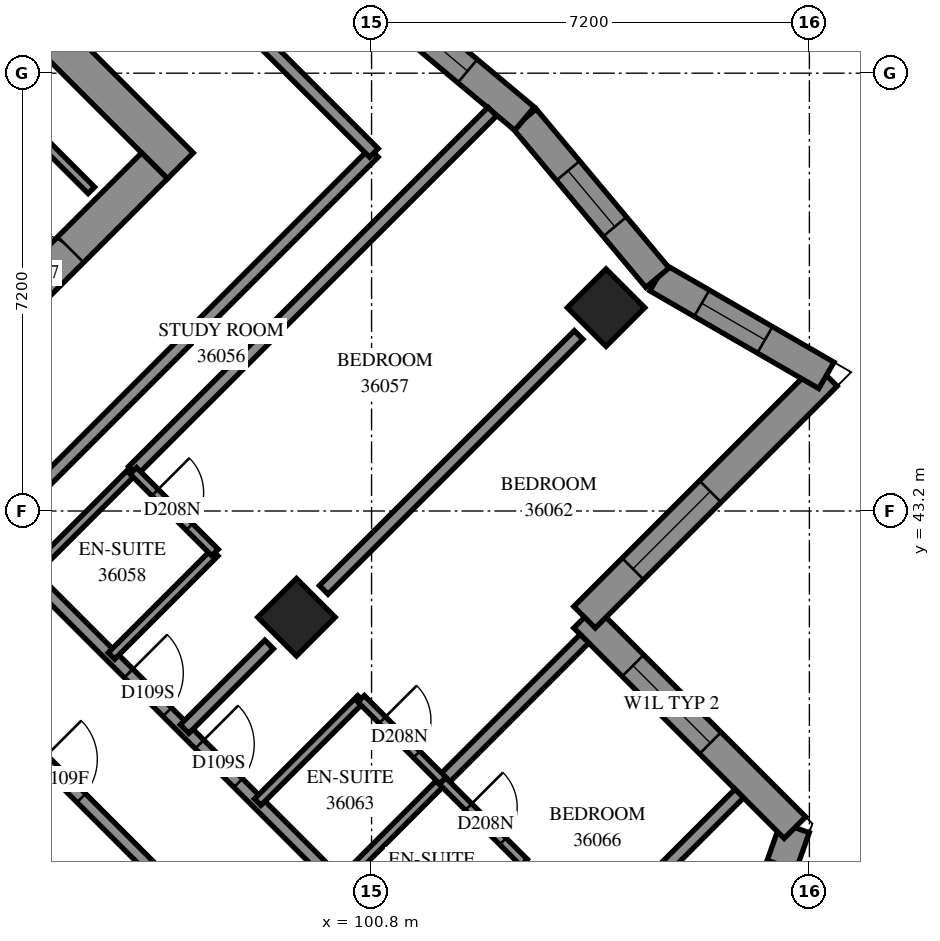
"""IFC4 building model, lengths in metres.
Left out: names, types, materials, properties, quantities, classifications, styles, units other than length and angle.
Written with IfcOpenShell. Run it as: python <this file> out.ifc"""

import sys

from ifc_helpers import new_model, si_unit, direction, frame, frame_2d, origin, origin_2d, place, context, subcontext, project, spatial, polyline, rectangle, outline, extrude, element, fill, save


model = new_model("IFC4")
c1 = context("Model", 3, precision=1e-05, world=origin(), true_north=direction((0.0, 1.0)))
c2 = subcontext(c1, "Body", "Model", "MODEL_VIEW")
j1 = project(units=[si_unit("LENGTHUNIT", "METRE"), si_unit("PLANEANGLEUNIT", "RADIAN")], contexts=[c1])
p1 = place(None, origin())
s1 = spatial("IfcSite", under=j1, at=p1, CompositionType="ELEMENT")
p2 = place(p1, origin())
s2 = spatial("IfcBuilding", under=s1, at=p2, CompositionType="ELEMENT")
p3 = place(p2, frame((0.0, 0.0, 135.4)))
s3 = spatial("IfcBuildingStorey", under=s2, at=p3, CompositionType="ELEMENT", Elevation=135.4)
for number, where, z_axis, x_axis in (
    (1, (104.656, 46.544, 0.0), (0.0, 0.0, 1.0), (0.707, -0.707, 0.0)),
    (2, (99.565, 41.453, 0.0), (0.0, 0.0, 1.0), (0.707, -0.707, 0.0)),
):
    element("IfcColumn", number, at=place(p3, frame(where, z_axis=z_axis, x_axis=x_axis)), inside=s3, PredefinedType="COLUMN", context=c2, shape_type="SweptSolid", body=[
        extrude(rectangle(XDim=0.9, YDim=0.9, at=origin_2d()), origin(), (0.0, 0.0, 1.0), 3.1),
    ])
p4 = place(p3, frame((86.625, 59.908, -0.3), z_axis=(0.0, 0.0, 1.0), x_axis=(0.7071067812, -0.7071067812, 0.0)))
e3 = element("IfcWall", 3, at=p4, inside=s3, PredefinedType="SHEAR", context=c2, shape_type="SweptSolid", body=[
    extrude(rectangle(XDim=15.6, YDim=0.6, at=frame_2d((7.8, 0.0))), origin(), (0.0, 0.0, 1.0), 2.7),
])
p5 = place(p4, frame((10.6, 0.0, 0.3)))
e4 = element("IfcOpeningElement", 4, at=p5, cuts=e3, PredefinedType="OPENING", context=c2, shape_type="SweptSolid", body=[
    extrude(rectangle(XDim=0.8, YDim=2.1, at=frame_2d((0.4, 1.05))), frame((0.0, 0.31, 0.0), z_axis=(0.0, -1.0, 0.0), x_axis=(1.0, 0.0, 0.0)), (0.0, 0.0, 1.0), 0.62),
])
p6 = place(p3, frame((87.049, 38.695, -0.3), z_axis=(0.0, 0.0, 1.0), x_axis=(0.7071067812, 0.7071067812, 0.0)))
e5 = element("IfcWall", 5, at=p6, inside=s3, PredefinedType="SHEAR", context=c2, shape_type="SweptSolid", body=[
    extrude(rectangle(XDim=14.4, YDim=0.6, at=frame_2d((7.2, 0.0))), origin(), (0.0, 0.0, 1.0), 2.7),
])
p7 = place(p6, frame((4.55, 0.0, 0.3)))
e6 = element("IfcOpeningElement", 6, at=p7, cuts=e5, PredefinedType="OPENING", context=c2, shape_type="SweptSolid", body=[
    extrude(rectangle(XDim=1.1, YDim=2.1, at=frame_2d((0.55, 1.05))), frame((0.0, 0.31, 0.0), z_axis=(0.0, -1.0, 0.0), x_axis=(1.0, 0.0, 0.0)), (0.0, 0.0, 1.0), 0.62),
])
p8 = place(p6, frame((11.35, 0.0, 0.3)))
e7 = element("IfcOpeningElement", 7, at=p8, cuts=e5, PredefinedType="OPENING", context=c2, shape_type="SweptSolid", body=[
    extrude(rectangle(XDim=1.1, YDim=2.1, at=frame_2d((0.55, 1.05))), frame((0.0, 0.31, 0.0), z_axis=(0.0, -1.0, 0.0), x_axis=(1.0, 0.0, 0.0)), (0.0, 0.0, 1.0), 0.62),
])
p9 = place(p3, frame((105.996, 33.0, 0.0), z_axis=(0.0, 0.0, 1.0), x_axis=(0.3333039777, 0.9428194199, 0.0)))
e8 = element("IfcWall", 8, at=p9, inside=s3, PredefinedType="SOLIDWALL", context=c2, shape_type="SweptSolid", body=[
    extrude(outline(polyline([(-0.114, -0.25), (5.454, -0.25), (5.139, 0.25), (0.114, 0.25), (-0.114, -0.25)])), origin(), (0.0, 0.0, 1.0), 3.1),
])
p10 = place(p9, frame((1.148, 0.0, 0.45)))
e9 = element("IfcOpeningElement", 9, at=p10, cuts=e8, PredefinedType="OPENING", context=c2, shape_type="SweptSolid", body=[
    extrude(rectangle(XDim=1.2, YDim=2.5, at=frame_2d((0.6, 1.25))), frame((0.0, 0.26, 0.0), z_axis=(0.0, -1.0, 0.0), x_axis=(1.0, 0.0, 0.0)), (0.0, 0.0, 1.0), 0.52),
])
p11 = place(p9, frame((3.461, 0.0, 0.45)))
e10 = element("IfcOpeningElement", 10, at=p11, cuts=e8, PredefinedType="OPENING", context=c2, shape_type="SweptSolid", body=[
    extrude(rectangle(XDim=1.2, YDim=2.5, at=frame_2d((0.6, 1.25))), frame((0.0, 0.26, 0.0), z_axis=(0.0, -1.0, 0.0), x_axis=(1.0, 0.0, 0.0)), (0.0, 0.0, 1.0), 0.52),
])
p12 = place(p3, frame((107.762, 37.994, 0.0), z_axis=(0.0, 0.0, 1.0), x_axis=(-0.707117001, 0.7070965612, 0.0)))
e11 = element("IfcWall", 11, at=p12, inside=s3, PredefinedType="SOLIDWALL", context=c2, shape_type="SweptSolid", body=[
    extrude(outline(polyline([(-0.158, -0.25), (4.642, -0.25), (5.142, 0.25), (0.158, 0.25), (-0.158, -0.25)])), origin(), (0.0, 0.0, 1.0), 3.1),
])
p13 = place(p12, frame((1.967, 0.0, 0.6)))
e12 = element("IfcOpeningElement", 12, at=p13, cuts=e11, PredefinedType="OPENING", context=c2, shape_type="SweptSolid", body=[
    extrude(rectangle(XDim=1.8, YDim=1.9, at=frame_2d((0.9, 0.95))), frame((0.0, 0.26, 0.0), z_axis=(0.0, -1.0, 0.0), x_axis=(1.0, 0.0, 0.0)), (0.0, 0.0, 1.0), 0.52),
])
p14 = place(p3, frame((104.302, 41.453, 0.0), z_axis=(0.0, 0.0, 1.0), x_axis=(0.70712456, 0.707089002, 0.0)))
e13 = element("IfcWall", 13, at=p14, inside=s3, PredefinedType="SOLIDWALL", context=c2, shape_type="SweptSolid", body=[
    extrude(outline(polyline([(0.25, -0.25), (5.95, -0.25), (5.299, 0.25), (-0.25, 0.25), (0.25, -0.25)])), origin(), (0.0, 0.0, 1.0), 3.1),
])
p15 = place(p14, frame((1.125, 0.0, 0.6)))
e14 = element("IfcOpeningElement", 14, at=p15, cuts=e13, PredefinedType="OPENING", context=c2, shape_type="SweptSolid", body=[
    extrude(rectangle(XDim=1.8, YDim=1.9, at=frame_2d((0.9, 0.95))), frame((0.0, 0.26, 0.0), z_axis=(0.0, -1.0, 0.0), x_axis=(1.0, 0.0, 0.0)), (0.0, 0.0, 1.0), 0.52),
])
p16 = place(p3, frame((108.279, 45.43, 0.0), z_axis=(0.0, 0.0, 1.0), x_axis=(-0.8655187184, 0.5008765798, 0.0)))
e15 = element("IfcWall", 15, at=p16, inside=s3, PredefinedType="SOLIDWALL", context=c2, shape_type="SweptSolid", body=[
    extrude(outline(polyline([(-0.326, -0.25), (3.165, -0.25), (3.253, 0.25), (0.326, 0.25), (-0.326, -0.25)])), origin(), (0.0, 0.0, 1.0), 3.1),
])
p17 = place(p16, frame((1.167, 0.0, 0.45)))
e16 = element("IfcOpeningElement", 16, at=p17, cuts=e15, PredefinedType="OPENING", context=c2, shape_type="SweptSolid", body=[
    extrude(rectangle(XDim=1.2, YDim=2.5, at=frame_2d((0.6, 1.25))), frame((0.0, 0.26, 0.0), z_axis=(0.0, -1.0, 0.0), x_axis=(1.0, 0.0, 0.0)), (0.0, 0.0, 1.0), 0.52),
])
p18 = place(p3, frame((105.502, 47.038, 0.0), z_axis=(0.0, 0.0, 1.0), x_axis=(-0.6416754301, 0.7669762984, 0.0)))
e17 = element("IfcWall", 17, at=p18, inside=s3, PredefinedType="SOLIDWALL", context=c2, shape_type="SweptSolid", body=[
    extrude(outline(polyline([(0.044, -0.25), (3.43, -0.25), (3.385, 0.25), (-0.044, 0.25), (0.044, -0.25)])), origin(), (0.0, 0.0, 1.0), 3.1),
])
p19 = place(p18, frame((1.093, 0.0, 0.45)))
e18 = element("IfcOpeningElement", 18, at=p19, cuts=e17, PredefinedType="OPENING", context=c2, shape_type="SweptSolid", body=[
    extrude(rectangle(XDim=1.2, YDim=2.5, at=frame_2d((0.6, 1.25))), frame((0.0, 0.26, 0.0), z_axis=(0.0, -1.0, 0.0), x_axis=(1.0, 0.0, 0.0)), (0.0, 0.0, 1.0), 0.52),
])
p20 = place(p3, frame((103.315, 49.651, 0.0), z_axis=(0.0, 0.0, 1.0), x_axis=(-0.7669851583, 0.64166484, 0.0)))
e19 = element("IfcWall", 19, at=p20, inside=s3, PredefinedType="SOLIDWALL", context=c2, shape_type="SweptSolid", body=[
    extrude(outline(polyline([(-0.022, -0.25), (3.364, -0.25), (3.408, 0.25), (0.022, 0.25), (-0.022, -0.25)])), origin(), (0.0, 0.0, 1.0), 3.1),
])
p21 = place(p20, frame((1.221, 0.0, 0.45)))
e20 = element("IfcOpeningElement", 20, at=p21, cuts=e19, PredefinedType="OPENING", context=c2, shape_type="SweptSolid", body=[
    extrude(rectangle(XDim=1.2, YDim=2.5, at=frame_2d((0.6, 1.25))), frame((0.0, 0.26, 0.0), z_axis=(0.0, -1.0, 0.0), x_axis=(1.0, 0.0, 0.0)), (0.0, 0.0, 1.0), 0.52),
])
p22 = place(p3, frame((91.313, 53.354, 0.0), z_axis=(0.0, 0.0, 1.0), x_axis=(0.7071140275, -0.7070995348, 0.0)))
e21 = element("IfcWall", 21, at=p22, inside=s3, PredefinedType="PARTITIONING", context=c2, shape_type="SweptSolid", body=[
    extrude(rectangle(XDim=6.9, YDim=0.15, at=frame_2d((3.45, 0.0))), origin(), (0.0, 0.0, 1.0), 3.1),
])
p23 = place(p3, frame((93.127, 41.379, 0.0), z_axis=(0.0, 0.0, 1.0), x_axis=(0.7071067812, -0.7071067812, 0.0)))
e22 = element("IfcWall", 22, at=p23, inside=s3, PredefinedType="PARTITIONING", context=c2, shape_type="SweptSolid", body=[
    extrude(rectangle(XDim=9.39, YDim=0.2, at=frame_2d((4.695, 0.0))), origin(), (0.0, 0.0, 1.0), 3.1),
])
p24 = place(p23, frame((3.2, 0.0, 0.0)))
e23 = element("IfcOpeningElement", 23, at=p24, cuts=e22, PredefinedType="OPENING", context=c2, shape_type="SweptSolid", body=[
    extrude(rectangle(XDim=0.9, YDim=2.1, at=frame_2d((0.45, 1.05))), frame((0.0, 0.11, 0.0), z_axis=(0.0, -1.0, 0.0), x_axis=(1.0, 0.0, 0.0)), (0.0, 0.0, 1.0), 0.22),
])
p25 = place(p3, frame((94.543, 42.797, 0.0), z_axis=(0.0, 0.0, 1.0), x_axis=(0.7071067812, 0.7071067812, 0.0)))
e24 = element("IfcWall", 24, at=p25, inside=s3, PredefinedType="PARTITIONING", context=c2, shape_type="SweptSolid", body=[
    extrude(rectangle(XDim=8.901, YDim=0.2, at=frame_2d((4.45, 0.0))), origin(), (0.0, 0.0, 1.0), 3.1),
])
p26 = place(p25, frame((0.193, 0.0, 0.0)))
e25 = element("IfcOpeningElement", 25, at=p26, cuts=e24, PredefinedType="OPENING", context=c2, shape_type="SweptSolid", body=[
    extrude(rectangle(XDim=1.0, YDim=2.1, at=frame_2d((0.5, 1.05))), frame((0.0, 0.11, 0.0), z_axis=(0.0, -1.0, 0.0), x_axis=(1.0, 0.0, 0.0)), (0.0, 0.0, 1.0), 0.22),
])
p27 = place(p3, frame((95.177, 42.157, 0.0), z_axis=(0.0, 0.0, 1.0), x_axis=(0.7071067812, -0.7071067812, 0.0)))
e26 = element("IfcWall", 26, at=p27, inside=s3, PredefinedType="PARTITIONING", context=c2, shape_type="SweptSolid", body=[
    extrude(rectangle(XDim=8.491, YDim=0.2, at=frame_2d((4.245, 0.0))), origin(), (0.0, 0.0, 1.0), 3.1),
])
p28 = place(p27, frame((2.3, 0.0, 0.0)))
e27 = element("IfcOpeningElement", 27, at=p28, cuts=e26, PredefinedType="OPENING", context=c2, shape_type="SweptSolid", body=[
    extrude(rectangle(XDim=0.9, YDim=2.1, at=frame_2d((0.45, 1.05))), frame((0.0, 0.11, 0.0), z_axis=(0.0, -1.0, 0.0), x_axis=(1.0, 0.0, 0.0)), (0.0, 0.0, 1.0), 0.22),
])
p29 = place(p27, frame((3.95, 0.0, 0.0)))
e28 = element("IfcOpeningElement", 28, at=p29, cuts=e26, PredefinedType="OPENING", context=c2, shape_type="SweptSolid", body=[
    extrude(rectangle(XDim=0.9, YDim=2.1, at=frame_2d((0.45, 1.05))), frame((0.0, 0.11, 0.0), z_axis=(0.0, -1.0, 0.0), x_axis=(1.0, 0.0, 0.0)), (0.0, 0.0, 1.0), 0.22),
])
p30 = place(p3, frame((96.875, 43.861, 0.0), z_axis=(0.0, 0.0, 1.0), x_axis=(0.7072324205, 0.7069811196, 0.0)))
e29 = element("IfcWall", 29, at=p30, inside=s3, PredefinedType="PARTITIONING", context=c2, shape_type="SweptSolid", body=[
    extrude(rectangle(XDim=8.357, YDim=0.2, at=frame_2d((4.178, 0.0))), origin(), (0.0, 0.0, 1.0), 3.1),
])
p31 = place(p3, frame((100.013, 41.903, 0.0), z_axis=(0.0, 0.0, 1.0), x_axis=(0.7071067812, 0.7071067812, 0.0)))
e30 = element("IfcWall", 30, at=p31, inside=s3, PredefinedType="PARTITIONING", context=c2, shape_type="SweptSolid", body=[
    extrude(rectangle(XDim=5.928, YDim=0.2, at=frame_2d((2.964, 0.0))), origin(), (0.0, 0.0, 1.0), 3.1),
])
p32 = place(p3, frame((98.221, 51.705, 0.0), z_axis=(0.0, 0.0, 1.0), x_axis=(0.7073229887, -0.7068905075, 0.0)))
e31 = element("IfcWall", 31, at=p32, inside=s3, PredefinedType="PARTITIONING", context=c2, shape_type="SweptSolid", body=[
    extrude(rectangle(XDim=3.7, YDim=0.2, at=frame_2d((1.85, 0.0))), origin(), (0.0, 0.0, 1.0), 3.1),
])
p33 = place(p3, frame((101.968, 38.766, 0.0), z_axis=(0.0, 0.0, 1.0), x_axis=(0.7071067812, 0.7071067812, 0.0)))
e32 = element("IfcWall", 32, at=p33, inside=s3, PredefinedType="PARTITIONING", context=c2, shape_type="SweptSolid", body=[
    extrude(rectangle(XDim=3.3, YDim=0.2, at=frame_2d((1.65, 0.0))), origin(), (0.0, 0.0, 1.0), 3.1),
])
p34 = place(p3, frame((105.105, 36.813, 0.0), z_axis=(0.0, 0.0, 1.0), x_axis=(0.7071067812, 0.7071067812, 0.0)))
e33 = element("IfcWall", 33, at=p34, inside=s3, PredefinedType="PARTITIONING", context=c2, shape_type="SweptSolid", body=[
    extrude(rectangle(XDim=2.463, YDim=0.2, at=frame_2d((1.232, 0.0))), origin(), (0.0, 0.0, 1.0), 3.1),
])
for number, where, z_axis, x_axis in (
    (34, (96.523, 40.817, 0.0), (0.0, 0.0, 1.0), (0.707, 0.707, 0.0)),
    (35, (98.927, 38.413, 0.0), (0.0, 0.0, 1.0), (0.707, 0.707, 0.0)),
    (36, (95.179, 42.161, 0.0), (0.0, 0.0, 1.0), (0.707, 0.707, 0.0)),
):
    element("IfcWall", number, at=place(p3, frame(where, z_axis=z_axis, x_axis=x_axis)), inside=s3, PredefinedType="PARTITIONING", context=c2, shape_type="SweptSolid", body=[
        extrude(rectangle(XDim=2.401, YDim=0.15, at=frame_2d((1.201, 0.0))), origin(), (0.0, 0.0, 1.0), 3.1),
    ])
p35 = place(p3, frame((100.273, 37.067, 0.0), z_axis=(0.0, 0.0, 1.0), x_axis=(0.706689978, 0.7075233388, 0.0)))
e37 = element("IfcWall", 37, at=p35, inside=s3, PredefinedType="PARTITIONING", context=c2, shape_type="SweptSolid", body=[
    extrude(rectangle(XDim=2.4, YDim=0.15, at=frame_2d((1.2, 0.0))), origin(), (0.0, 0.0, 1.0), 3.1),
])
p36 = place(p3, frame((101.615, 35.727, 0.0), z_axis=(0.0, 0.0, 1.0), x_axis=(0.7071067812, 0.7071067812, 0.0)))
e38 = element("IfcWall", 38, at=p36, inside=s3, PredefinedType="PARTITIONING", context=c2, shape_type="SweptSolid", body=[
    extrude(rectangle(XDim=2.398, YDim=0.15, at=frame_2d((1.199, 0.0))), origin(), (0.0, 0.0, 1.0), 3.1),
])
p37 = place(p3, frame((97.725, 39.615, 0.0), z_axis=(0.0, 0.0, 1.0), x_axis=(0.7071067812, 0.7071067812, 0.0)))
e39 = element("IfcWall", 39, at=p37, inside=s3, PredefinedType="PARTITIONING", context=c2, shape_type="SweptSolid", body=[
    extrude(rectangle(XDim=1.966, YDim=0.2, at=frame_2d((0.983, 0.0))), origin(), (0.0, 0.0, 1.0), 3.1),
])
p38 = place(p3, frame((96.881, 43.861, 0.0), z_axis=(0.0, 0.0, 1.0), x_axis=(0.7071067812, -0.7071067812, 0.0)))
e40 = element("IfcWall", 40, at=p38, inside=s3, PredefinedType="PARTITIONING", context=c2, shape_type="SweptSolid", body=[
    extrude(rectangle(XDim=1.901, YDim=0.15, at=frame_2d((0.95, 0.0))), origin(), (0.0, 0.0, 1.0), 3.1),
])
p39 = place(p38, frame((0.505, 0.0, 0.0)))
e41 = element("IfcOpeningElement", 41, at=p39, cuts=e40, PredefinedType="OPENING", context=c2, shape_type="SweptSolid", body=[
    extrude(rectangle(XDim=0.8, YDim=2.1, at=frame_2d((0.4, 1.05))), frame((0.0, 0.085, 0.0), z_axis=(0.0, -1.0, 0.0), x_axis=(1.0, 0.0, 0.0)), (0.0, 0.0, 1.0), 0.17),
])
p40 = place(p3, frame((101.965, 38.763, 0.0), z_axis=(0.0, 0.0, 1.0), x_axis=(0.7071067812, -0.7071067812, 0.0)))
e42 = element("IfcWall", 42, at=p40, inside=s3, PredefinedType="PARTITIONING", context=c2, shape_type="SweptSolid", body=[
    extrude(rectangle(XDim=1.901, YDim=0.15, at=frame_2d((0.95, 0.0))), origin(), (0.0, 0.0, 1.0), 3.1),
])
p41 = place(p40, frame((0.608, 0.0, 0.0)))
e43 = element("IfcOpeningElement", 43, at=p41, cuts=e42, PredefinedType="OPENING", context=c2, shape_type="SweptSolid", body=[
    extrude(rectangle(XDim=0.8, YDim=2.1, at=frame_2d((0.4, 1.05))), frame((0.0, 0.085, 0.0), z_axis=(0.0, -1.0, 0.0), x_axis=(1.0, 0.0, 0.0)), (0.0, 0.0, 1.0), 0.17),
])
p42 = place(p3, frame((100.628, 40.112, 0.0), z_axis=(0.0, 0.0, 1.0), x_axis=(0.7065800724, -0.7076330979, 0.0)))
e44 = element("IfcWall", 44, at=p42, inside=s3, PredefinedType="PARTITIONING", context=c2, shape_type="SweptSolid", body=[
    extrude(rectangle(XDim=1.899, YDim=0.15, at=frame_2d((0.95, 0.0))), origin(), (0.0, 0.0, 1.0), 3.1),
])
p43 = place(p42, frame((0.493, 0.0, 0.0)))
e45 = element("IfcOpeningElement", 45, at=p43, cuts=e44, PredefinedType="OPENING", context=c2, shape_type="SweptSolid", body=[
    extrude(rectangle(XDim=0.8, YDim=2.1, at=frame_2d((0.4, 1.05))), frame((0.0, 0.085, 0.0), z_axis=(0.0, -1.0, 0.0), x_axis=(1.0, 0.0, 0.0)), (0.0, 0.0, 1.0), 0.17),
])
p44 = place(p11, origin())
e46 = element("IfcWindow", 46, at=p44, inside=s3, PartitioningType="SINGLE_PANEL", PredefinedType="WINDOW", context=c2, shape_type="SweptSolid", body=[
    extrude(rectangle(XDim=1.2, YDim=2.5, at=frame_2d((0.6, 1.25))), frame((0.0, 0.18, 0.0), z_axis=(0.0, -1.0, 0.0), x_axis=(1.0, 0.0, 0.0)), (0.0, 0.0, 1.0), 0.06),
])
fill(e10, e46)
p45 = place(p13, origin())
e47 = element("IfcWindow", 47, at=p45, inside=s3, PartitioningType="SINGLE_PANEL", PredefinedType="WINDOW", context=c2, shape_type="SweptSolid", body=[
    extrude(rectangle(XDim=1.8, YDim=1.9, at=frame_2d((0.9, 0.95))), frame((0.0, 0.18, 0.0), z_axis=(0.0, -1.0, 0.0), x_axis=(1.0, 0.0, 0.0)), (0.0, 0.0, 1.0), 0.06),
])
fill(e12, e47)
p46 = place(p15, origin())
e48 = element("IfcWindow", 48, at=p46, inside=s3, PartitioningType="SINGLE_PANEL", PredefinedType="WINDOW", context=c2, shape_type="SweptSolid", body=[
    extrude(rectangle(XDim=1.8, YDim=1.9, at=frame_2d((0.9, 0.95))), frame((0.0, 0.18, 0.0), z_axis=(0.0, -1.0, 0.0), x_axis=(1.0, 0.0, 0.0)), (0.0, 0.0, 1.0), 0.06),
])
fill(e14, e48)
p47 = place(p17, origin())
e49 = element("IfcWindow", 49, at=p47, inside=s3, PartitioningType="SINGLE_PANEL", PredefinedType="WINDOW", context=c2, shape_type="SweptSolid", body=[
    extrude(rectangle(XDim=1.2, YDim=2.5, at=frame_2d((0.6, 1.25))), frame((0.0, 0.18, 0.0), z_axis=(0.0, -1.0, 0.0), x_axis=(1.0, 0.0, 0.0)), (0.0, 0.0, 1.0), 0.06),
])
fill(e16, e49)
p48 = place(p19, origin())
e50 = element("IfcWindow", 50, at=p48, inside=s3, PartitioningType="SINGLE_PANEL", PredefinedType="WINDOW", context=c2, shape_type="SweptSolid", body=[
    extrude(rectangle(XDim=1.2, YDim=2.5, at=frame_2d((0.6, 1.25))), frame((0.0, 0.18, 0.0), z_axis=(0.0, -1.0, 0.0), x_axis=(1.0, 0.0, 0.0)), (0.0, 0.0, 1.0), 0.06),
])
fill(e18, e50)
p49 = place(p21, origin())
e51 = element("IfcWindow", 51, at=p49, inside=s3, PartitioningType="SINGLE_PANEL", PredefinedType="WINDOW", context=c2, shape_type="SweptSolid", body=[
    extrude(rectangle(XDim=1.2, YDim=2.5, at=frame_2d((0.6, 1.25))), frame((0.0, 0.18, 0.0), z_axis=(0.0, -1.0, 0.0), x_axis=(1.0, 0.0, 0.0)), (0.0, 0.0, 1.0), 0.06),
])
fill(e20, e51)
p50 = place(p8, origin())
e52 = element("IfcDoor", 52, at=p50, inside=s3, OperationType="SINGLE_SWING_RIGHT", PredefinedType="DOOR", context=c2, shape_type="SweptSolid", body=[
    extrude(rectangle(XDim=1.1, YDim=2.1, at=frame_2d((0.55, 1.05))), frame((0.0, 0.025, 0.0), z_axis=(0.0, -1.0, 0.0), x_axis=(1.0, 0.0, 0.0)), (0.0, 0.0, 1.0), 0.05),
])
fill(e7, e52)
p51 = place(p28, origin())
e53 = element("IfcDoor", 53, at=p51, inside=s3, OperationType="SINGLE_SWING_RIGHT", PredefinedType="DOOR", context=c2, shape_type="SweptSolid", body=[
    extrude(rectangle(XDim=0.9, YDim=2.1, at=frame_2d((0.45, 1.05))), frame((0.0, 0.025, 0.0), z_axis=(0.0, -1.0, 0.0), x_axis=(1.0, 0.0, 0.0)), (0.0, 0.0, 1.0), 0.05),
])
fill(e27, e53)
p52 = place(p39, origin())
e54 = element("IfcDoor", 54, at=p52, inside=s3, OperationType="SINGLE_SWING_RIGHT", PredefinedType="DOOR", context=c2, shape_type="SweptSolid", body=[
    extrude(rectangle(XDim=0.8, YDim=2.1, at=frame_2d((0.4, 1.05))), frame((0.0, 0.025, 0.0), z_axis=(0.0, -1.0, 0.0), x_axis=(1.0, 0.0, 0.0)), (0.0, 0.0, 1.0), 0.05),
])
fill(e41, e54)
p53 = place(p24, origin())
e55 = element("IfcDoor", 55, at=p53, inside=s3, OperationType="SINGLE_SWING_LEFT", PredefinedType="DOOR", context=c2, shape_type="SweptSolid", body=[
    extrude(rectangle(XDim=0.9, YDim=2.1, at=frame_2d((0.45, 1.05))), frame((0.0, 0.025, 0.0), z_axis=(0.0, -1.0, 0.0), x_axis=(1.0, 0.0, 0.0)), (0.0, 0.0, 1.0), 0.05),
])
fill(e23, e55)
p54 = place(p29, origin())
e56 = element("IfcDoor", 56, at=p54, inside=s3, OperationType="SINGLE_SWING_LEFT", PredefinedType="DOOR", context=c2, shape_type="SweptSolid", body=[
    extrude(rectangle(XDim=0.9, YDim=2.1, at=frame_2d((0.45, 1.05))), frame((0.0, 0.025, 0.0), z_axis=(0.0, -1.0, 0.0), x_axis=(1.0, 0.0, 0.0)), (0.0, 0.0, 1.0), 0.05),
])
fill(e28, e56)
p55 = place(p43, origin())
e57 = element("IfcDoor", 57, at=p55, inside=s3, OperationType="SINGLE_SWING_RIGHT", PredefinedType="DOOR", context=c2, shape_type="SweptSolid", body=[
    extrude(rectangle(XDim=0.8, YDim=2.1, at=frame_2d((0.4, 1.05))), frame((0.0, 0.025, 0.0), z_axis=(0.0, -1.0, 0.0), x_axis=(1.0, 0.0, 0.0)), (0.0, 0.0, 1.0), 0.05),
])
fill(e45, e57)
p56 = place(p41, origin())
e58 = element("IfcDoor", 58, at=p56, inside=s3, OperationType="SINGLE_SWING_RIGHT", PredefinedType="DOOR", context=c2, shape_type="SweptSolid", body=[
    extrude(rectangle(XDim=0.8, YDim=2.1, at=frame_2d((0.4, 1.05))), frame((0.0, 0.025, 0.0), z_axis=(0.0, -1.0, 0.0), x_axis=(1.0, 0.0, 0.0)), (0.0, 0.0, 1.0), 0.05),
])
fill(e43, e58)
save(model, sys.argv[1])
